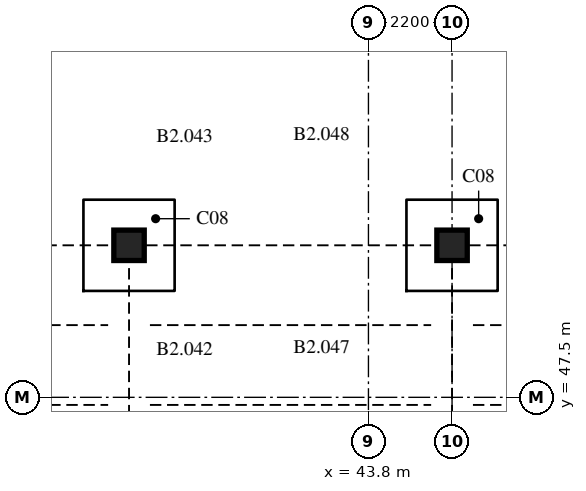
"""IFC4 building model, lengths in metres.
Left out: names, types, materials, properties, quantities, classifications, styles, units other than length and angle.
Written with IfcOpenShell. Run it as: python <this file> out.ifc"""

import sys

from ifc_helpers import new_model, si_unit, direction, frame, origin, origin_2d, place, context, subcontext, project, spatial, rectangle, extrude, element, save


model = new_model("IFC4")
c1 = context("Model", 3, precision=1e-05, world=origin(), true_north=direction((0.0, 1.0)))
c2 = subcontext(c1, "Body", "Model", "MODEL_VIEW")
j1 = project(units=[si_unit("LENGTHUNIT", "METRE"), si_unit("PLANEANGLEUNIT", "RADIAN")], contexts=[c1])
p1 = place(None, origin())
s1 = spatial("IfcSite", under=j1, at=p1, CompositionType="ELEMENT")
p2 = place(p1, origin())
s2 = spatial("IfcBuilding", under=s1, at=p2, CompositionType="ELEMENT")
p3 = place(p2, frame((0.0, 0.0, -7.5)))
s3 = spatial("IfcBuildingStorey", under=s2, at=p3, CompositionType="ELEMENT", Elevation=-7.5)
for number, where, z_axis, x_axis in (
    (1, (37.5, 51.5, -0.6), (0.0, 0.0, 1.0), (1.0, 0.0, 0.0)),
    (2, (46.0, 51.5, -0.6), (0.0, 0.0, 1.0), (1.0, 0.0, 0.0)),
):
    element("IfcColumn", number, at=place(p3, frame(where, z_axis=z_axis, x_axis=x_axis)), inside=s3, PredefinedType="COLUMN", context=c2, shape_type="SweptSolid", body=[
        extrude(rectangle(XDim=0.8, YDim=0.8, at=origin_2d()), origin(), (0.0, 0.0, 1.0), 4.1),
    ])
save(model, sys.argv[1])
